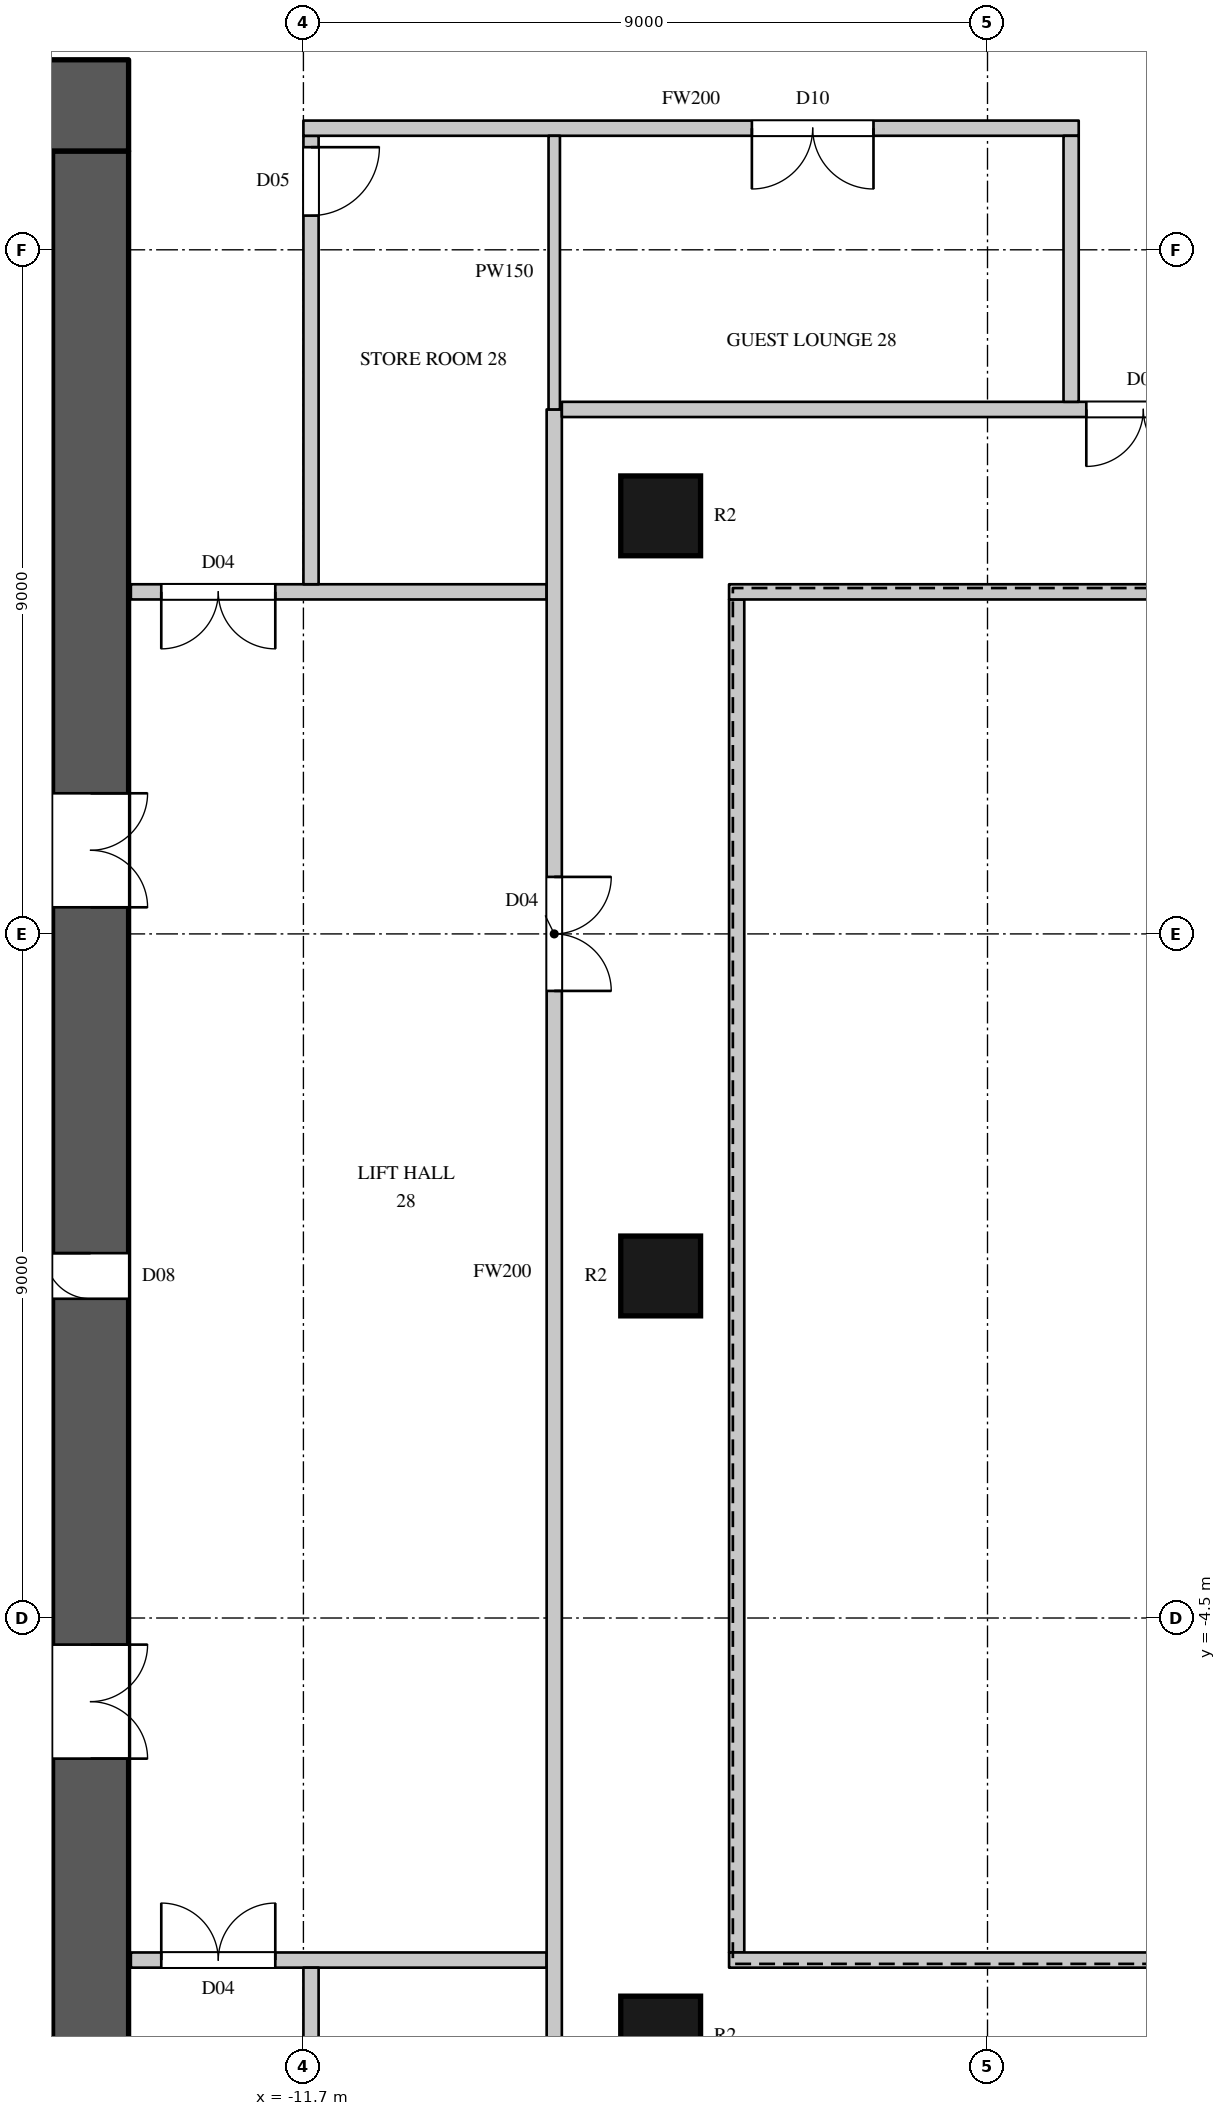
"""IFC4 building model, lengths in metres.
Left out: names, types, materials, properties, quantities, classifications, styles, units other than length and angle.
Written with IfcOpenShell. Run it as: python <this file> out.ifc"""

import sys

from ifc_helpers import new_model, si_unit, direction, frame, frame_2d, origin, origin_2d, place, context, subcontext, project, spatial, rectangle, circle, extrude, element, fill, save


model = new_model("IFC4")
c1 = context("Model", 3, precision=1e-05, world=origin(), true_north=direction((0.0, 1.0)))
c2 = subcontext(c1, "Body", "Model", "MODEL_VIEW")
j1 = project(units=[si_unit("LENGTHUNIT", "METRE"), si_unit("PLANEANGLEUNIT", "RADIAN")], contexts=[c1])
p1 = place(None, origin())
s1 = spatial("IfcSite", under=j1, at=p1, CompositionType="ELEMENT")
p2 = place(p1, origin())
s2 = spatial("IfcBuilding", under=s1, at=p2, CompositionType="ELEMENT")
p3 = place(p2, frame((0.0, 0.0, 131.1)))
s3 = spatial("IfcBuildingStorey", under=s2, at=p3, CompositionType="ELEMENT", Elevation=131.1)
for number, where, z_axis, x_axis in (
    (1, (-7.0, -10.0, 0.0), (0.0, 0.0, 1.0), (1.0, 0.0, 0.0)),
    (2, (-7.0, 0.0, 0.0), (0.0, 0.0, 1.0), (1.0, 0.0, 0.0)),
    (3, (-7.0, 10.0, 0.0), (0.0, 0.0, 1.0), (1.0, 0.0, 0.0)),
):
    element("IfcColumn", number, at=place(p3, frame(where, z_axis=z_axis, x_axis=x_axis)), inside=s3, PredefinedType="COLUMN", context=c2, shape_type="SweptSolid", body=[
        extrude(circle(Radius=0.525, at=origin_2d()), origin(), (0.0, 0.0, 1.0), 3.6),
    ])
p4 = place(p3, frame((-30.0, 15.4, 0.0), z_axis=(0.0, 0.0, 1.0), x_axis=(1.0, 0.0, 0.0)))
e4 = element("IfcWall", 4, at=p4, inside=s3, PredefinedType="SHEAR", context=c2, shape_type="SweptSolid", body=[
    extrude(rectangle(XDim=16.0, YDim=1.2, at=frame_2d((8.0, 0.0))), origin(), (0.0, 0.0, 1.0), 3.6),
])
p5 = place(p4, frame((13.4, 0.0, 0.0)))
e5 = element("IfcOpeningElement", 5, at=p5, cuts=e4, PredefinedType="OPENING", context=c2, shape_type="SweptSolid", body=[
    extrude(rectangle(XDim=1.5, YDim=2.4, at=frame_2d((0.75, 1.2))), frame((0.0, 0.61, 0.0), z_axis=(0.0, -1.0, 0.0), x_axis=(1.0, 0.0, 0.0)), (0.0, 0.0, 1.0), 1.22),
])
p6 = place(p3, frame((-14.5, -14.8, 0.0), z_axis=(0.0, 0.0, 1.0), x_axis=(0.0, 1.0, 0.0)))
e6 = element("IfcWall", 6, at=p6, inside=s3, PredefinedType="SHEAR", context=c2, shape_type="SweptSolid", body=[
    extrude(rectangle(XDim=29.6, YDim=1.0, at=frame_2d((14.8, 0.0))), origin(), (0.0, 0.0, 1.0), 3.6),
])
p7 = place(p6, frame((8.45, 0.0, 0.0)))
e7 = element("IfcOpeningElement", 7, at=p7, cuts=e6, PredefinedType="OPENING", context=c2, shape_type="SweptSolid", body=[
    extrude(rectangle(XDim=1.5, YDim=2.4, at=frame_2d((0.75, 1.2))), frame((0.0, 0.51, 0.0), z_axis=(0.0, -1.0, 0.0), x_axis=(1.0, 0.0, 0.0)), (0.0, 0.0, 1.0), 1.02),
])
p8 = place(p6, frame((19.65, 0.0, 0.0)))
e8 = element("IfcOpeningElement", 8, at=p8, cuts=e6, PredefinedType="OPENING", context=c2, shape_type="SweptSolid", body=[
    extrude(rectangle(XDim=1.5, YDim=2.4, at=frame_2d((0.75, 1.2))), frame((0.0, 0.51, 0.0), z_axis=(0.0, -1.0, 0.0), x_axis=(1.0, 0.0, 0.0)), (0.0, 0.0, 1.0), 1.02),
])
p9 = place(p6, frame((14.5, 0.0, 0.0)))
e9 = element("IfcOpeningElement", 9, at=p9, cuts=e6, PredefinedType="OPENING", context=c2, shape_type="SweptSolid", body=[
    extrude(rectangle(XDim=0.6, YDim=2.0, at=frame_2d((0.3, 1.0))), frame((0.0, 0.51, 0.0), z_axis=(0.0, -1.0, 0.0), x_axis=(1.0, 0.0, 0.0)), (0.0, 0.0, 1.0), 1.02),
])
p10 = place(p3, frame((-13.97, -9.0, 0.0), z_axis=(0.0, 0.0, 1.0), x_axis=(1.0, 0.0, 0.0)))
e10 = element("IfcWall", 10, at=p10, inside=s3, PredefinedType="PARTITIONING", context=c2, shape_type="SweptSolid", body=[
    extrude(rectangle(XDim=5.47, YDim=0.2, at=frame_2d((2.735, 0.0))), origin(), (0.0, 0.0, 1.0), 3.3),
])
p11 = place(p10, frame((0.4, 0.0, 0.0)))
e11 = element("IfcOpeningElement", 11, at=p11, cuts=e10, PredefinedType="OPENING", context=c2, shape_type="SweptSolid", body=[
    extrude(rectangle(XDim=1.5, YDim=2.2, at=frame_2d((0.75, 1.1))), frame((0.0, 0.11, 0.0), z_axis=(0.0, -1.0, 0.0), x_axis=(1.0, 0.0, 0.0)), (0.0, 0.0, 1.0), 0.22),
])
p12 = place(p3, frame((-13.97, 9.0, 0.0), z_axis=(0.0, 0.0, 1.0), x_axis=(1.0, 0.0, 0.0)))
e12 = element("IfcWall", 12, at=p12, inside=s3, PredefinedType="PARTITIONING", context=c2, shape_type="SweptSolid", body=[
    extrude(rectangle(XDim=5.47, YDim=0.2, at=frame_2d((2.735, 0.0))), origin(), (0.0, 0.0, 1.0), 3.3),
])
p13 = place(p12, frame((0.4, 0.0, 0.0)))
e13 = element("IfcOpeningElement", 13, at=p13, cuts=e12, PredefinedType="OPENING", context=c2, shape_type="SweptSolid", body=[
    extrude(rectangle(XDim=1.5, YDim=2.2, at=frame_2d((0.75, 1.1))), frame((0.0, 0.11, 0.0), z_axis=(0.0, -1.0, 0.0), x_axis=(1.0, 0.0, 0.0)), (0.0, 0.0, 1.0), 0.22),
])
p14 = place(p3, frame((-11.6, -15.0, 0.0), z_axis=(0.0, 0.0, 1.0), x_axis=(0.0, 1.0, 0.0)))
e14 = element("IfcWall", 14, at=p14, inside=s3, PredefinedType="PARTITIONING", context=c2, shape_type="SweptSolid", body=[
    extrude(rectangle(XDim=5.9, YDim=0.2, at=frame_2d((2.95, 0.0))), origin(), (0.0, 0.0, 1.0), 2.6),
])
p15 = place(p14, frame((0.15, 0.0, 0.0)))
e15 = element("IfcOpeningElement", 15, at=p15, cuts=e14, PredefinedType="OPENING", context=c2, shape_type="SweptSolid", body=[
    extrude(rectangle(XDim=0.9, YDim=2.2, at=frame_2d((0.45, 1.1))), frame((0.0, 0.11, 0.0), z_axis=(0.0, -1.0, 0.0), x_axis=(1.0, 0.0, 0.0)), (0.0, 0.0, 1.0), 0.22),
])
p16 = place(p3, frame((-11.6, 9.1, 0.0), z_axis=(0.0, 0.0, 1.0), x_axis=(0.0, 1.0, 0.0)))
e16 = element("IfcWall", 16, at=p16, inside=s3, PredefinedType="PARTITIONING", context=c2, shape_type="SweptSolid", body=[
    extrude(rectangle(XDim=5.9, YDim=0.2, at=frame_2d((2.95, 0.0))), origin(), (0.0, 0.0, 1.0), 2.6),
])
p17 = place(p16, frame((4.85, 0.0, 0.0)))
e17 = element("IfcOpeningElement", 17, at=p17, cuts=e16, PredefinedType="OPENING", context=c2, shape_type="SweptSolid", body=[
    extrude(rectangle(XDim=0.9, YDim=2.2, at=frame_2d((0.45, 1.1))), frame((0.0, 0.11, 0.0), z_axis=(0.0, -1.0, 0.0), x_axis=(1.0, 0.0, 0.0)), (0.0, 0.0, 1.0), 0.22),
])
p18 = place(p3, frame((-11.7, 15.1, 0.0), z_axis=(0.0, 0.0, 1.0), x_axis=(1.0, 0.0, 0.0)))
e18 = element("IfcWall", 18, at=p18, inside=s3, PredefinedType="PARTITIONING", context=c2, shape_type="SweptSolid", body=[
    extrude(rectangle(XDim=10.2, YDim=0.2, at=frame_2d((5.1, 0.0))), origin(), (0.0, 0.0, 1.0), 3.3),
])
p19 = place(p18, frame((5.9, 0.0, 0.0)))
e19 = element("IfcOpeningElement", 19, at=p19, cuts=e18, PredefinedType="OPENING", context=c2, shape_type="SweptSolid", body=[
    extrude(rectangle(XDim=1.6, YDim=2.4, at=frame_2d((0.8, 1.2))), frame((0.0, 0.11, 0.0), z_axis=(0.0, -1.0, 0.0), x_axis=(1.0, 0.0, 0.0)), (0.0, 0.0, 1.0), 0.22),
])
p20 = place(p3, frame((-8.4, -11.3, 0.0), z_axis=(0.0, 0.0, 1.0), x_axis=(0.0, 1.0, 0.0)))
e20 = element("IfcWall", 20, at=p20, inside=s3, PredefinedType="PARTITIONING", context=c2, shape_type="SweptSolid", body=[
    extrude(rectangle(XDim=22.7, YDim=0.2, at=frame_2d((11.35, 0.0))), origin(), (0.0, 0.0, 1.0), 3.3),
])
p21 = place(p20, frame((15.05, 0.0, 0.0)))
e21 = element("IfcOpeningElement", 21, at=p21, cuts=e20, PredefinedType="OPENING", context=c2, shape_type="SweptSolid", body=[
    extrude(rectangle(XDim=1.5, YDim=2.2, at=frame_2d((0.75, 1.1))), frame((0.0, 0.11, 0.0), z_axis=(0.0, -1.0, 0.0), x_axis=(1.0, 0.0, 0.0)), (0.0, 0.0, 1.0), 0.22),
])
p22 = place(p3, frame((-8.3, 11.4, 0.0), z_axis=(0.0, 0.0, 1.0), x_axis=(1.0, 0.0, 0.0)))
e22 = element("IfcWall", 22, at=p22, inside=s3, PredefinedType="PARTITIONING", context=c2, shape_type="SweptSolid", body=[
    extrude(rectangle(XDim=18.7, YDim=0.2, at=frame_2d((9.35, 0.0))), origin(), (0.0, 0.0, 1.0), 3.3),
])
p23 = place(p22, frame((6.9, 0.0, 0.0)))
e23 = element("IfcOpeningElement", 23, at=p23, cuts=e22, PredefinedType="OPENING", context=c2, shape_type="SweptSolid", body=[
    extrude(rectangle(XDim=1.5, YDim=2.2, at=frame_2d((0.75, 1.1))), frame((0.0, 0.11, 0.0), z_axis=(0.0, -1.0, 0.0), x_axis=(1.0, 0.0, 0.0)), (0.0, 0.0, 1.0), 0.22),
])
p24 = place(p3, frame((-6.0, -8.9, 0.0), z_axis=(0.0, 0.0, 1.0), x_axis=(0.0, 1.0, 0.0)))
e24 = element("IfcWall", 24, at=p24, inside=s3, PredefinedType="PARTITIONING", context=c2, shape_type="SweptSolid", body=[
    extrude(rectangle(XDim=17.8, YDim=0.2, at=frame_2d((8.9, 0.0))), origin(), (0.0, 0.0, 1.0), 3.3),
])
for number, where, z_axis, x_axis in (
    (25, (-6.1, -9.0, 0.0), (0.0, 0.0, 1.0), (1.0, 0.0, 0.0)),
    (26, (-6.1, 9.0, 0.0), (0.0, 0.0, 1.0), (1.0, 0.0, 0.0)),
):
    element("IfcWall", number, at=place(p3, frame(where, z_axis=z_axis, x_axis=x_axis)), inside=s3, PredefinedType="PARTITIONING", context=c2, shape_type="SweptSolid", body=[
        extrude(rectangle(XDim=14.2, YDim=0.2, at=frame_2d((7.1, 0.0))), origin(), (0.0, 0.0, 1.0), 3.3),
    ])
p25 = place(p3, frame((-1.6, 11.5, 0.0), z_axis=(0.0, 0.0, 1.0), x_axis=(0.0, 1.0, 0.0)))
e27 = element("IfcWall", 27, at=p25, inside=s3, PredefinedType="PARTITIONING", context=c2, shape_type="SweptSolid", body=[
    extrude(rectangle(XDim=3.5, YDim=0.2, at=frame_2d((1.75, 0.0))), origin(), (0.0, 0.0, 1.0), 3.3),
])
p26 = place(p3, frame((-8.4, 11.4, 0.0), z_axis=(0.0, 0.0, 1.0), x_axis=(0.0, 1.0, 0.0)))
e28 = element("IfcWall", 28, at=p26, inside=s3, PredefinedType="PARTITIONING", context=c2, shape_type="SweptSolid", body=[
    extrude(rectangle(XDim=3.6, YDim=0.15, at=frame_2d((1.8, 0.0))), origin(), (0.0, 0.0, 1.0), 3.3),
])
p27 = place(p21, origin())
e29 = element("IfcDoor", 29, at=p27, inside=s3, OperationType="DOUBLE_DOOR_SINGLE_SWING", PredefinedType="DOOR", context=c2, shape_type="SweptSolid", body=[
    extrude(rectangle(XDim=1.5, YDim=2.2, at=frame_2d((0.75, 1.1))), frame((0.0, 0.025, 0.0), z_axis=(0.0, -1.0, 0.0), x_axis=(1.0, 0.0, 0.0)), (0.0, 0.0, 1.0), 0.05),
])
fill(e21, e29)
p28 = place(p11, origin())
e30 = element("IfcDoor", 30, at=p28, inside=s3, OperationType="DOUBLE_DOOR_SINGLE_SWING", PredefinedType="DOOR", context=c2, shape_type="SweptSolid", body=[
    extrude(rectangle(XDim=1.5, YDim=2.2, at=frame_2d((0.75, 1.1))), frame((0.0, 0.025, 0.0), z_axis=(0.0, -1.0, 0.0), x_axis=(1.0, 0.0, 0.0)), (0.0, 0.0, 1.0), 0.05),
])
fill(e11, e30)
p29 = place(p13, origin())
e31 = element("IfcDoor", 31, at=p29, inside=s3, OperationType="DOUBLE_DOOR_SINGLE_SWING", PredefinedType="DOOR", context=c2, shape_type="SweptSolid", body=[
    extrude(rectangle(XDim=1.5, YDim=2.2, at=frame_2d((0.75, 1.1))), frame((0.0, 0.025, 0.0), z_axis=(0.0, -1.0, 0.0), x_axis=(1.0, 0.0, 0.0)), (0.0, 0.0, 1.0), 0.05),
])
fill(e13, e31)
p30 = place(p23, origin())
e32 = element("IfcDoor", 32, at=p30, inside=s3, OperationType="DOUBLE_DOOR_SINGLE_SWING", PredefinedType="DOOR", context=c2, shape_type="SweptSolid", body=[
    extrude(rectangle(XDim=1.5, YDim=2.2, at=frame_2d((0.75, 1.1))), frame((0.0, 0.025, 0.0), z_axis=(0.0, -1.0, 0.0), x_axis=(1.0, 0.0, 0.0)), (0.0, 0.0, 1.0), 0.05),
])
fill(e23, e32)
p31 = place(p17, origin())
e33 = element("IfcDoor", 33, at=p31, inside=s3, OperationType="SINGLE_SWING_LEFT", PredefinedType="DOOR", context=c2, shape_type="SweptSolid", body=[
    extrude(rectangle(XDim=0.9, YDim=2.2, at=frame_2d((0.45, 1.1))), frame((0.0, 0.025, 0.0), z_axis=(0.0, -1.0, 0.0), x_axis=(1.0, 0.0, 0.0)), (0.0, 0.0, 1.0), 0.05),
])
fill(e17, e33)
p32 = place(p19, origin())
e34 = element("IfcDoor", 34, at=p32, inside=s3, OperationType="DOUBLE_DOOR_SINGLE_SWING", PredefinedType="DOOR", context=c2, shape_type="SweptSolid", body=[
    extrude(rectangle(XDim=1.6, YDim=2.4, at=frame_2d((0.8, 1.2))), frame((0.0, 0.025, 0.0), z_axis=(0.0, -1.0, 0.0), x_axis=(1.0, 0.0, 0.0)), (0.0, 0.0, 1.0), 0.05),
])
fill(e19, e34)
p33 = place(p7, origin())
e35 = element("IfcDoor", 35, at=p33, inside=s3, OperationType="DOUBLE_DOOR_SINGLE_SWING", PredefinedType="DOOR", context=c2, shape_type="SweptSolid", body=[
    extrude(rectangle(XDim=1.5, YDim=2.4, at=frame_2d((0.75, 1.2))), frame((0.0, -0.445, 0.0), z_axis=(0.0, -1.0, 0.0), x_axis=(1.0, 0.0, 0.0)), (0.0, 0.0, 1.0), 0.05),
])
fill(e7, e35)
p34 = place(p8, origin())
e36 = element("IfcDoor", 36, at=p34, inside=s3, OperationType="DOUBLE_DOOR_SINGLE_SWING", PredefinedType="DOOR", context=c2, shape_type="SweptSolid", body=[
    extrude(rectangle(XDim=1.5, YDim=2.4, at=frame_2d((0.75, 1.2))), frame((0.0, -0.445, 0.0), z_axis=(0.0, -1.0, 0.0), x_axis=(1.0, 0.0, 0.0)), (0.0, 0.0, 1.0), 0.05),
])
fill(e8, e36)
p35 = place(p9, origin())
e37 = element("IfcDoor", 37, at=p35, inside=s3, OperationType="SINGLE_SWING_RIGHT", PredefinedType="DOOR", context=c2, shape_type="SweptSolid", body=[
    extrude(rectangle(XDim=0.6, YDim=2.0, at=frame_2d((0.3, 1.0))), frame((0.0, 0.495, 0.0), z_axis=(0.0, -1.0, 0.0), x_axis=(1.0, 0.0, 0.0)), (0.0, 0.0, 1.0), 0.05),
])
fill(e9, e37)
save(model, sys.argv[1])
